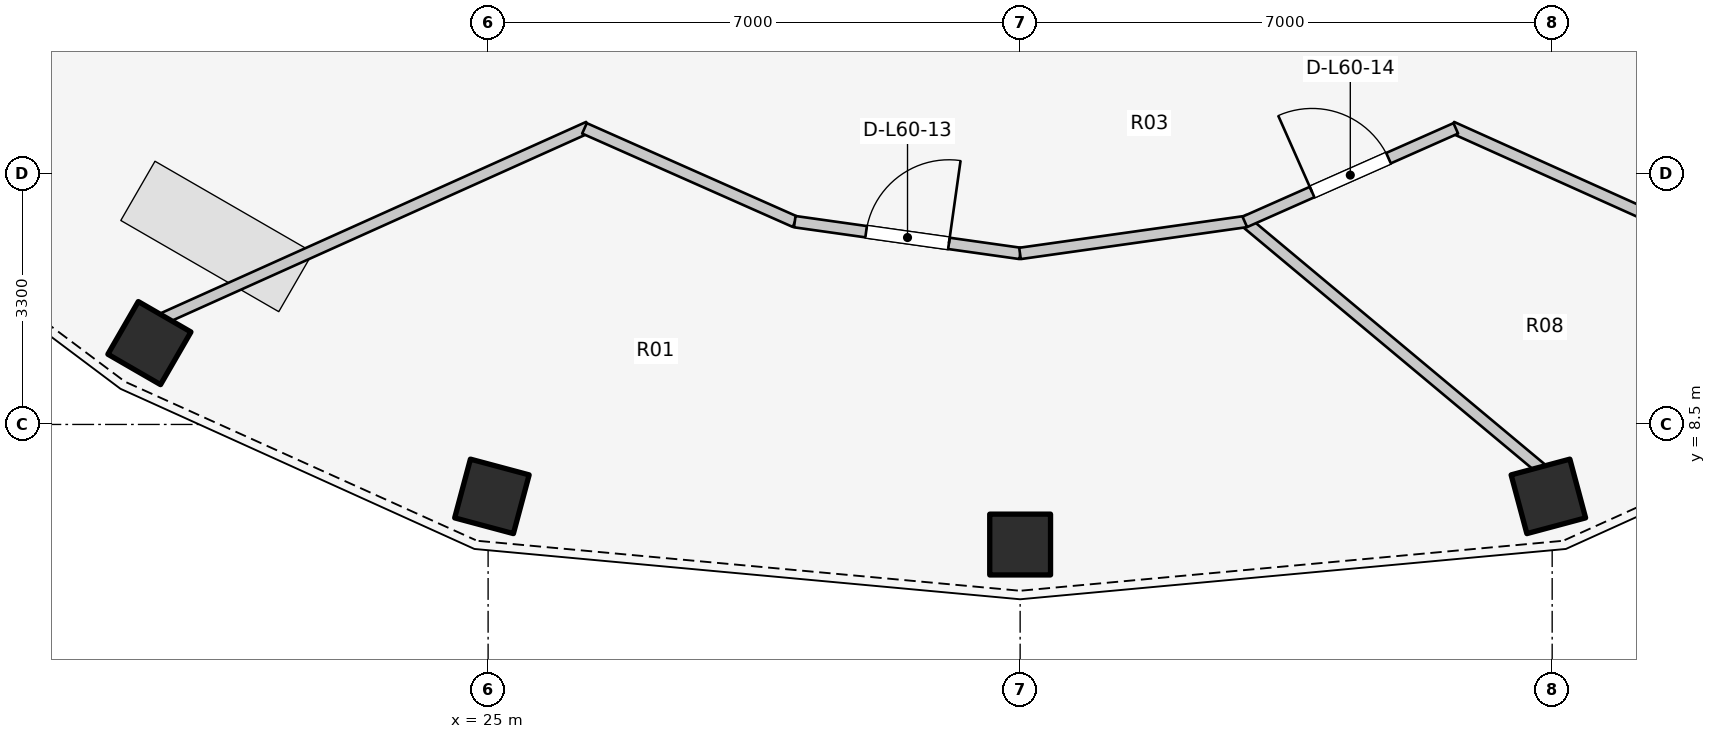
"""IFC4 building model, lengths in metres.
Left out: names, types, materials, properties, quantities, classifications, styles, units other than length and angle.
Written with IfcOpenShell. Run it as: python <this file> out.ifc"""

import sys

from ifc_helpers import new_model, si_unit, direction, frame, frame_2d, origin, origin_2d, place, context, subcontext, project, spatial, rectangle, extrude, element, fill, save


model = new_model("IFC4")
c1 = context("Model", 3, precision=1e-05, world=origin(), true_north=direction((0.0, 1.0)))
c2 = subcontext(c1, "Body", "Model", "MODEL_VIEW")
j1 = project(units=[si_unit("LENGTHUNIT", "METRE"), si_unit("PLANEANGLEUNIT", "RADIAN")], contexts=[c1])
p1 = place(None, origin())
s1 = spatial("IfcSite", under=j1, at=p1, CompositionType="ELEMENT")
p2 = place(p1, origin())
s2 = spatial("IfcBuilding", under=s1, at=p2, CompositionType="ELEMENT")
p3 = place(p2, frame((0.0, 0.0, 197.4)))
s3 = spatial("IfcBuildingStorey", under=s2, at=p3, CompositionType="ELEMENT", Elevation=197.4)
for number, where, z_axis, x_axis in (
    (1, (20.544, 9.57, 0.0), (0.0, 0.0, 1.0), (-0.5, -0.866, 0.0)),
    (2, (25.05, 7.554, 0.0), (0.0, 0.0, 1.0), (-0.259, -0.966, 0.0)),
    (3, (32.0, 6.92, 0.0), (0.0, 0.0, 1.0), (0.0, -1.0, 0.0)),
    (4, (38.95, 7.554, 0.0), (0.0, 0.0, 1.0), (0.259, -0.966, 0.0)),
):
    element("IfcColumn", number, at=place(p3, frame(where, z_axis=z_axis, x_axis=x_axis)), inside=s3, PredefinedType="COLUMN", context=c2, shape_type="SweptSolid", body=[
        extrude(rectangle(XDim=0.8, YDim=0.8, at=origin_2d()), origin(), (0.0, 0.0, 1.0), 4.2),
    ])
p4 = place(p3, frame((26.321, 12.412, 0.0), z_axis=(0.0, 0.0, 1.0), x_axis=(-0.912031098102, -0.410121050538, 0.0)))
e5 = element("IfcWall", 5, at=p4, inside=s3, PredefinedType="PARTITIONING", context=c2, shape_type="SweptSolid", body=[
    extrude(rectangle(XDim=6.125, YDim=0.15, at=frame_2d((3.063, 0.0))), origin(), (0.0, 0.0, 1.0), 2.32),
])
p5 = place(p3, frame((34.925, 11.199, 0.0), z_axis=(0.0, 0.0, 1.0), x_axis=(0.767598896653, -0.640930521865, 0.0)))
e6 = element("IfcWall", 6, at=p5, inside=s3, PredefinedType="PARTITIONING", context=c2, shape_type="SweptSolid", body=[
    extrude(rectangle(XDim=5.115, YDim=0.15, at=frame_2d((2.558, 0.0))), origin(), (0.0, 0.0, 1.0), 2.32),
])
p6 = place(p3, frame((26.268, 12.396, 0.0), z_axis=(0.0, 0.0, 1.0), x_axis=(0.914156698007, -0.405360989106, 0.0)))
e7 = element("IfcWall", 7, at=p6, inside=s3, PredefinedType="PARTITIONING", context=c2, shape_type="SweptSolid", body=[
    extrude(rectangle(XDim=3.031, YDim=0.15, at=frame_2d((1.515, 0.0))), origin(), (0.0, 0.0, 1.0), 2.32),
])
p7 = place(p3, frame((29.035, 11.168, 0.0), z_axis=(0.0, 0.0, 1.0), x_axis=(0.990224603287, -0.139482024093, 0.0)))
e8 = element("IfcWall", 8, at=p7, inside=s3, PredefinedType="PARTITIONING", context=c2, shape_type="SweptSolid", body=[
    extrude(rectangle(XDim=2.997, YDim=0.15, at=frame_2d((1.498, 0.0))), origin(), (0.0, 0.0, 1.0), 2.32),
])
p8 = place(p7, frame((0.948, 0.0, 0.0)))
e9 = element("IfcOpeningElement", 9, at=p8, cuts=e8, PredefinedType="OPENING", context=c2, shape_type="SweptSolid", body=[
    extrude(rectangle(XDim=1.1, YDim=2.1, at=frame_2d((0.55, 1.05))), frame((0.0, 0.085, 0.0), z_axis=(0.0, -1.0, 0.0), x_axis=(1.0, 0.0, 0.0)), (0.0, 0.0, 1.0), 0.17),
])
p9 = place(p3, frame((31.998, 10.75, 0.0), z_axis=(0.0, 0.0, 1.0), x_axis=(0.990183914421, 0.139770582106, 0.0)))
e10 = element("IfcWall", 10, at=p9, inside=s3, PredefinedType="PARTITIONING", context=c2, shape_type="SweptSolid", body=[
    extrude(rectangle(XDim=3.003, YDim=0.15, at=frame_2d((1.501, 0.0))), origin(), (0.0, 0.0, 1.0), 2.32),
])
p10 = place(p3, frame((37.679, 12.412, 0.0), z_axis=(0.0, 0.0, 1.0), x_axis=(0.912031098102, -0.410121050538, 0.0)))
e11 = element("IfcWall", 11, at=p10, inside=s3, PredefinedType="PARTITIONING", context=c2, shape_type="SweptSolid", body=[
    extrude(rectangle(XDim=6.125, YDim=0.15, at=frame_2d((3.063, 0.0))), origin(), (0.0, 0.0, 1.0), 2.32),
])
p11 = place(p3, frame((34.956, 11.165, 0.0), z_axis=(0.0, 0.0, 1.0), x_axis=(0.914251978061, 0.405146048496, 0.0)))
e12 = element("IfcWall", 12, at=p11, inside=s3, PredefinedType="PARTITIONING", context=c2, shape_type="SweptSolid", body=[
    extrude(rectangle(XDim=3.036, YDim=0.15, at=frame_2d((1.518, 0.0))), origin(), (0.0, 0.0, 1.0), 2.32),
])
p12 = place(p11, frame((0.968, 0.0, 0.0)))
e13 = element("IfcOpeningElement", 13, at=p12, cuts=e12, PredefinedType="OPENING", context=c2, shape_type="SweptSolid", body=[
    extrude(rectangle(XDim=1.1, YDim=2.1, at=frame_2d((0.55, 1.05))), frame((0.0, 0.085, 0.0), z_axis=(0.0, -1.0, 0.0), x_axis=(1.0, 0.0, 0.0)), (0.0, 0.0, 1.0), 0.17),
])
p13 = place(p8, origin())
e14 = element("IfcDoor", 14, at=p13, inside=s3, OperationType="SINGLE_SWING_RIGHT", PredefinedType="DOOR", context=c2, shape_type="SweptSolid", body=[
    extrude(rectangle(XDim=1.1, YDim=2.1, at=frame_2d((0.55, 1.05))), frame((0.0, 0.025, 0.0), z_axis=(0.0, -1.0, 0.0), x_axis=(1.0, 0.0, 0.0)), (0.0, 0.0, 1.0), 0.05),
])
fill(e9, e14)
p14 = place(p12, origin())
e15 = element("IfcDoor", 15, at=p14, inside=s3, OperationType="SINGLE_SWING_LEFT", PredefinedType="DOOR", context=c2, shape_type="SweptSolid", body=[
    extrude(rectangle(XDim=1.1, YDim=2.1, at=frame_2d((0.55, 1.05))), frame((0.0, 0.025, 0.0), z_axis=(0.0, -1.0, 0.0), x_axis=(1.0, 0.0, 0.0)), (0.0, 0.0, 1.0), 0.05),
])
fill(e13, e15)
save(model, sys.argv[1])
